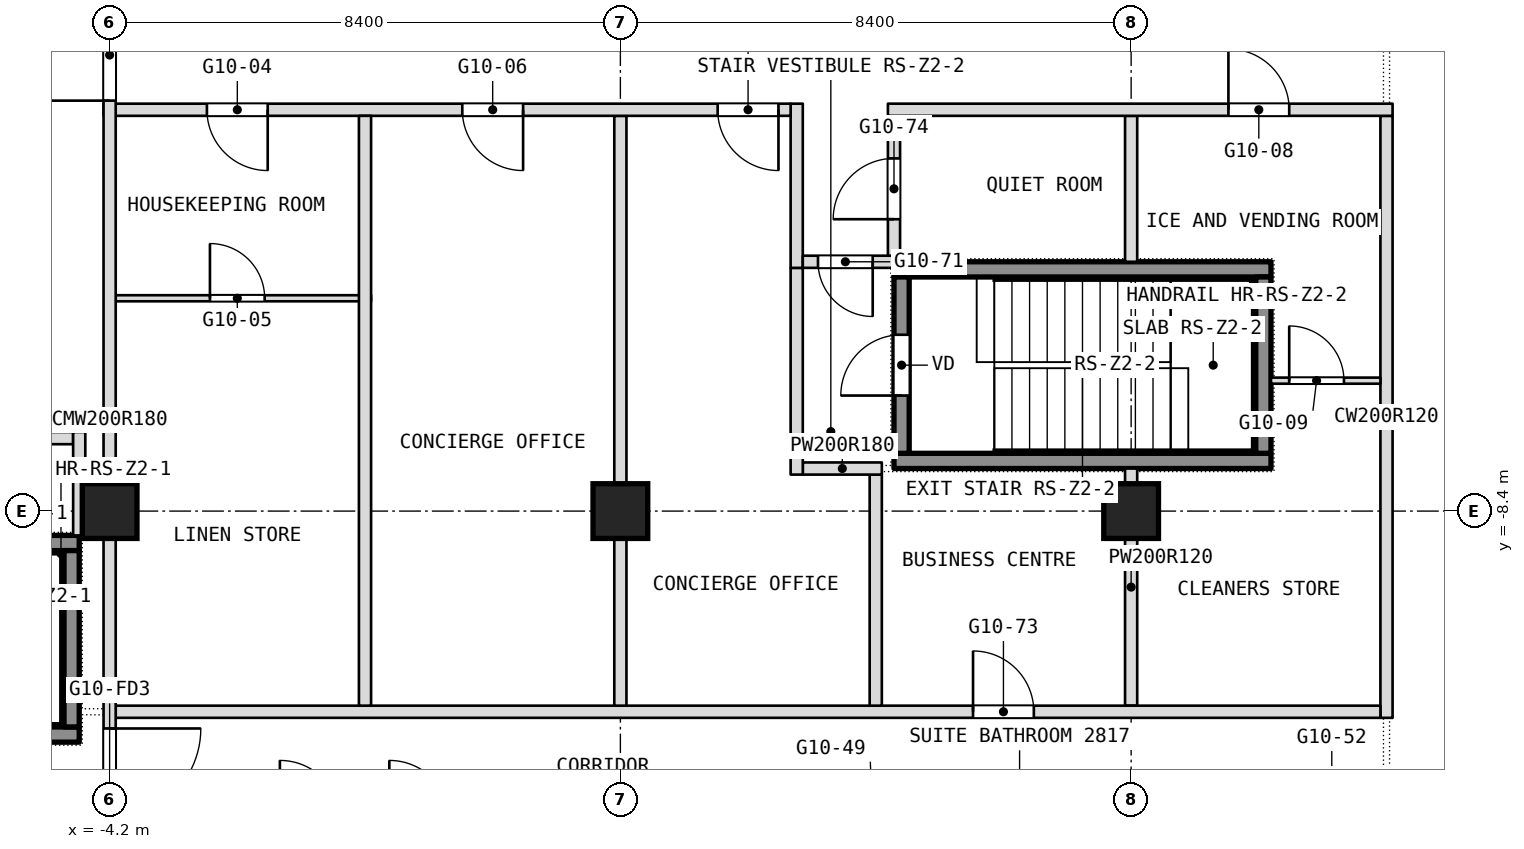
"""IFC4 building model, lengths in metres.
Left out: names, types, materials, properties, quantities, classifications, styles, units other than length and angle.
Written with IfcOpenShell. Run it as: python <this file> out.ifc"""

import sys

from ifc_helpers import new_model, si_unit, direction, frame, frame_2d, origin, origin_2d, place, context, subcontext, project, spatial, rectangle, extrude, element, fill, save


model = new_model("IFC4")
c1 = context("Model", 3, precision=1e-05, world=origin(), true_north=direction((0.0, 1.0)))
c2 = subcontext(c1, "Body", "Model", "MODEL_VIEW")
j1 = project(units=[si_unit("LENGTHUNIT", "METRE"), si_unit("PLANEANGLEUNIT", "RADIAN")], contexts=[c1])
p1 = place(None, origin())
s1 = spatial("IfcSite", under=j1, at=p1, CompositionType="ELEMENT")
p2 = place(p1, origin())
s2 = spatial("IfcBuilding", under=s1, at=p2, CompositionType="ELEMENT")
p3 = place(p2, frame((0.0, 0.0, 126.5)))
s3 = spatial("IfcBuildingStorey", under=s2, at=p3, CompositionType="ELEMENT", Elevation=126.5)
for number, where, z_axis, x_axis in (
    (1, (-4.2, -8.4, 0.0), (0.0, 0.0, 1.0), (1.0, 0.0, 0.0)),
    (2, (4.2, -8.4, 0.0), (0.0, 0.0, 1.0), (1.0, 0.0, 0.0)),
    (3, (12.6, -8.4, 0.0), (0.0, 0.0, 1.0), (1.0, 0.0, 0.0)),
):
    element("IfcColumn", number, at=place(p3, frame(where, z_axis=z_axis, x_axis=x_axis)), inside=s3, PredefinedType="COLUMN", context=c2, shape_type="SweptSolid", body=[
        extrude(rectangle(XDim=0.9, YDim=0.9, at=origin_2d()), origin(), (0.0, 0.0, 1.0), 3.6),
    ])
p4 = place(p3, frame((16.8, -11.8, 0.0), z_axis=(0.0, 0.0, 1.0), x_axis=(0.0, 1.0, 0.0)))
e4 = element("IfcWall", 4, at=p4, inside=s3, PredefinedType="PARTITIONING", context=c2, shape_type="SweptSolid", body=[
    extrude(rectangle(XDim=9.9, YDim=0.2, at=frame_2d((4.95, 0.0))), origin(), (0.0, 0.0, 1.0), 3.34),
])
p5 = place(p3, frame((12.6, -11.6, 0.0), z_axis=(0.0, 0.0, 1.0), x_axis=(0.0, 1.0, 0.0)))
e5 = element("IfcWall", 5, at=p5, inside=s3, PredefinedType="PARTITIONING", context=c2, shape_type="SweptSolid", body=[
    extrude(rectangle(XDim=3.9, YDim=0.2, at=frame_2d((1.95, 0.0))), origin(), (0.0, 0.0, 1.0), 3.34),
])
p6 = place(p3, frame((12.6, -4.3, 0.0), z_axis=(0.0, 0.0, 1.0), x_axis=(0.0, 1.0, 0.0)))
e6 = element("IfcWall", 6, at=p6, inside=s3, PredefinedType="PARTITIONING", context=c2, shape_type="SweptSolid", body=[
    extrude(rectangle(XDim=2.4, YDim=0.2, at=frame_2d((1.2, 0.0))), origin(), (0.0, 0.0, 1.0), 3.34),
])
p7 = place(p3, frame((-4.1, -11.7, 0.0), z_axis=(0.0, 0.0, 1.0), x_axis=(1.0, 0.0, 0.0)))
e7 = element("IfcWall", 7, at=p7, inside=s3, PredefinedType="PARTITIONING", context=c2, shape_type="SweptSolid", body=[
    extrude(rectangle(XDim=20.8, YDim=0.2, at=frame_2d((10.4, 0.0))), origin(), (0.0, 0.0, 1.0), 3.34),
])
p8 = place(p7, frame((14.1, 0.0, 0.0)))
e8 = element("IfcOpeningElement", 8, at=p8, cuts=e7, PredefinedType="OPENING", context=c2, shape_type="SweptSolid", body=[
    extrude(rectangle(XDim=1.0, YDim=2.1, at=frame_2d((0.5, 1.05))), frame((0.0, 0.1, 0.0), z_axis=(0.0, -1.0, 0.0), x_axis=(1.0, 0.0, 0.0)), (0.0, 0.0, 1.0), 0.2),
])
p9 = place(p3, frame((8.7, -4.3, 0.0), z_axis=(0.0, 0.0, 1.0), x_axis=(0.0, 1.0, 0.0)))
e9 = element("IfcWall", 9, at=p9, inside=s3, PredefinedType="PARTITIONING", context=c2, shape_type="SweptSolid", body=[
    extrude(rectangle(XDim=2.4, YDim=0.2, at=frame_2d((1.2, 0.0))), origin(), (0.0, 0.0, 1.0), 3.34),
])
p10 = place(p9, frame((0.7, 0.0, 0.0)))
e10 = element("IfcOpeningElement", 10, at=p10, cuts=e9, PredefinedType="OPENING", context=c2, shape_type="SweptSolid", body=[
    extrude(rectangle(XDim=1.0, YDim=2.1, at=frame_2d((0.5, 1.05))), frame((0.0, 0.1, 0.0), z_axis=(0.0, -1.0, 0.0), x_axis=(1.0, 0.0, 0.0)), (0.0, 0.0, 1.0), 0.2),
])
p11 = place(p3, frame((8.4, -11.6, 0.0), z_axis=(0.0, 0.0, 1.0), x_axis=(0.0, 1.0, 0.0)))
e11 = element("IfcWall", 11, at=p11, inside=s3, PredefinedType="PARTITIONING", context=c2, shape_type="SweptSolid", body=[
    extrude(rectangle(XDim=3.8, YDim=0.2, at=frame_2d((1.9, 0.0))), origin(), (0.0, 0.0, 1.0), 3.34),
])
p12 = place(p3, frame((7.2, -7.7, 0.0), z_axis=(0.0, 0.0, 1.0), x_axis=(1.0, 0.0, 0.0)))
e12 = element("IfcWall", 12, at=p12, inside=s3, PredefinedType="PARTITIONING", context=c2, shape_type="SweptSolid", body=[
    extrude(rectangle(XDim=1.3, YDim=0.2, at=frame_2d((0.65, 0.0))), origin(), (0.0, 0.0, 1.0), 3.34),
])
p13 = place(p3, frame((-8.5, -7.2, 0.0), z_axis=(0.0, 0.0, 1.0), x_axis=(1.0, 0.0, 0.0)))
e13 = element("IfcWall", 13, at=p13, inside=s3, PredefinedType="PARTITIONING", context=c2, shape_type="SweptSolid", body=[
    extrude(rectangle(XDim=3.7, YDim=0.2, at=frame_2d((1.85, 0.0))), origin(), (0.0, 0.0, 1.0), 3.34),
])
p14 = place(p13, frame((0.25, 0.0, 0.0)))
e14 = element("IfcOpeningElement", 14, at=p14, cuts=e13, PredefinedType="OPENING", context=c2, shape_type="SweptSolid", body=[
    extrude(rectangle(XDim=0.9, YDim=2.1, at=frame_2d((0.45, 1.05))), frame((0.0, 0.1, 0.0), z_axis=(0.0, -1.0, 0.0), x_axis=(1.0, 0.0, 0.0)), (0.0, 0.0, 1.0), 0.2),
])
p15 = place(p3, frame((7.1, -7.8, 0.0), z_axis=(0.0, 0.0, 1.0), x_axis=(0.0, 1.0, 0.0)))
e15 = element("IfcWall", 15, at=p15, inside=s3, PredefinedType="PARTITIONING", context=c2, shape_type="SweptSolid", body=[
    extrude(rectangle(XDim=3.4, YDim=0.2, at=frame_2d((1.7, 0.0))), origin(), (0.0, 0.0, 1.0), 3.34),
])
p16 = place(p3, frame((7.1, -4.4, 0.0), z_axis=(0.0, 0.0, 1.0), x_axis=(0.0, 1.0, 0.0)))
e16 = element("IfcWall", 16, at=p16, inside=s3, PredefinedType="PARTITIONING", context=c2, shape_type="SweptSolid", body=[
    extrude(rectangle(XDim=2.7, YDim=0.2, at=frame_2d((1.35, 0.0))), origin(), (0.0, 0.0, 1.0), 3.34),
])
p17 = place(p3, frame((14.9, -6.255, 0.0), z_axis=(0.0, 0.0, 1.0), x_axis=(1.0, 0.0, 0.0)))
e17 = element("IfcWall", 17, at=p17, inside=s3, PredefinedType="PARTITIONING", context=c2, shape_type="SweptSolid", body=[
    extrude(rectangle(XDim=1.8, YDim=0.1, at=frame_2d((0.9, 0.0))), origin(), (0.0, 0.0, 1.0), 3.34),
])
p18 = place(p17, frame((0.3, 0.0, 0.0)))
e18 = element("IfcOpeningElement", 18, at=p18, cuts=e17, PredefinedType="OPENING", context=c2, shape_type="SweptSolid", body=[
    extrude(rectangle(XDim=0.9, YDim=2.1, at=frame_2d((0.45, 1.05))), frame((0.0, 0.05, 0.0), z_axis=(0.0, -1.0, 0.0), x_axis=(1.0, 0.0, 0.0)), (0.0, 0.0, 1.0), 0.1),
])
p19 = place(p3, frame((-4.1, -4.9, 0.0), z_axis=(0.0, 0.0, 1.0), x_axis=(1.0, 0.0, 0.0)))
e19 = element("IfcWall", 19, at=p19, inside=s3, PredefinedType="PARTITIONING", context=c2, shape_type="SweptSolid", body=[
    extrude(rectangle(XDim=4.2, YDim=0.1, at=frame_2d((2.1, 0.0))), origin(), (0.0, 0.0, 1.0), 3.34),
])
p20 = place(p19, frame((1.55, 0.0, 0.0)))
e20 = element("IfcOpeningElement", 20, at=p20, cuts=e19, PredefinedType="OPENING", context=c2, shape_type="SweptSolid", body=[
    extrude(rectangle(XDim=0.9, YDim=2.1, at=frame_2d((0.45, 1.05))), frame((0.0, 0.05, 0.0), z_axis=(0.0, -1.0, 0.0), x_axis=(1.0, 0.0, 0.0)), (0.0, 0.0, 1.0), 0.1),
])
p21 = place(p3, frame((7.2, -4.3, 0.0), z_axis=(0.0, 0.0, 1.0), x_axis=(1.0, 0.0, 0.0)))
e21 = element("IfcWall", 21, at=p21, inside=s3, PredefinedType="PARTITIONING", context=c2, shape_type="SweptSolid", body=[
    extrude(rectangle(XDim=1.5, YDim=0.2, at=frame_2d((0.75, 0.0))), origin(), (0.0, 0.0, 1.0), 3.34),
])
p22 = place(p21, frame((0.25, 0.0, 0.0)))
e22 = element("IfcOpeningElement", 22, at=p22, cuts=e21, PredefinedType="OPENING", context=c2, shape_type="SweptSolid", body=[
    extrude(rectangle(XDim=0.9, YDim=2.1, at=frame_2d((0.45, 1.05))), frame((0.0, 0.1, 0.0), z_axis=(0.0, -1.0, 0.0), x_axis=(1.0, 0.0, 0.0)), (0.0, 0.0, 1.0), 0.2),
])
p23 = place(p3, frame((4.2, -11.6, 0.0), z_axis=(0.0, 0.0, 1.0), x_axis=(0.0, 1.0, 0.0)))
e23 = element("IfcWall", 23, at=p23, inside=s3, PredefinedType="PARTITIONING", context=c2, shape_type="SweptSolid", body=[
    extrude(rectangle(XDim=9.7, YDim=0.2, at=frame_2d((4.85, 0.0))), origin(), (0.0, 0.0, 1.0), 3.34),
])
p24 = place(p3, frame((-4.3, -1.8, 0.0), z_axis=(0.0, 0.0, 1.0), x_axis=(1.0, 0.0, 0.0)))
e24 = element("IfcWall", 24, at=p24, inside=s3, PredefinedType="PARTITIONING", context=c2, shape_type="SweptSolid", body=[
    extrude(rectangle(XDim=11.3, YDim=0.2, at=frame_2d((5.65, 0.0))), origin(), (0.0, 0.0, 1.0), 3.34),
])
p25 = place(p24, frame((1.7, 0.0, 0.0)))
e25 = element("IfcOpeningElement", 25, at=p25, cuts=e24, PredefinedType="OPENING", context=c2, shape_type="SweptSolid", body=[
    extrude(rectangle(XDim=1.0, YDim=2.1, at=frame_2d((0.5, 1.05))), frame((0.0, 0.1, 0.0), z_axis=(0.0, -1.0, 0.0), x_axis=(1.0, 0.0, 0.0)), (0.0, 0.0, 1.0), 0.2),
])
p26 = place(p24, frame((5.9, 0.0, 0.0)))
e26 = element("IfcOpeningElement", 26, at=p26, cuts=e24, PredefinedType="OPENING", context=c2, shape_type="SweptSolid", body=[
    extrude(rectangle(XDim=1.0, YDim=2.1, at=frame_2d((0.5, 1.05))), frame((0.0, 0.1, 0.0), z_axis=(0.0, -1.0, 0.0), x_axis=(1.0, 0.0, 0.0)), (0.0, 0.0, 1.0), 0.2),
])
p27 = place(p24, frame((10.1, 0.0, 0.0)))
e27 = element("IfcOpeningElement", 27, at=p27, cuts=e24, PredefinedType="OPENING", context=c2, shape_type="SweptSolid", body=[
    extrude(rectangle(XDim=1.0, YDim=2.1, at=frame_2d((0.5, 1.05))), frame((0.0, 0.1, 0.0), z_axis=(0.0, -1.0, 0.0), x_axis=(1.0, 0.0, 0.0)), (0.0, 0.0, 1.0), 0.2),
])
p28 = place(p3, frame((8.6, -1.8, 0.0), z_axis=(0.0, 0.0, 1.0), x_axis=(1.0, 0.0, 0.0)))
e28 = element("IfcWall", 28, at=p28, inside=s3, PredefinedType="PARTITIONING", context=c2, shape_type="SweptSolid", body=[
    extrude(rectangle(XDim=8.3, YDim=0.2, at=frame_2d((4.15, 0.0))), origin(), (0.0, 0.0, 1.0), 3.34),
])
p29 = place(p28, frame((5.6, 0.0, 0.0)))
e29 = element("IfcOpeningElement", 29, at=p29, cuts=e28, PredefinedType="OPENING", context=c2, shape_type="SweptSolid", body=[
    extrude(rectangle(XDim=1.0, YDim=2.1, at=frame_2d((0.5, 1.05))), frame((0.0, 0.1, 0.0), z_axis=(0.0, -1.0, 0.0), x_axis=(1.0, 0.0, 0.0)), (0.0, 0.0, 1.0), 0.2),
])
p30 = place(p3, frame((0.0, -11.6, 0.0), z_axis=(0.0, 0.0, 1.0), x_axis=(0.0, 1.0, 0.0)))
e30 = element("IfcWall", 30, at=p30, inside=s3, PredefinedType="PARTITIONING", context=c2, shape_type="SweptSolid", body=[
    extrude(rectangle(XDim=9.7, YDim=0.2, at=frame_2d((4.85, 0.0))), origin(), (0.0, 0.0, 1.0), 3.34),
])
p31 = place(p3, frame((-4.2, -13.8, 0.0), z_axis=(0.0, 0.0, 1.0), x_axis=(0.0, 1.0, 0.0)))
e31 = element("IfcWall", 31, at=p31, inside=s3, PredefinedType="PARTITIONING", context=c2, shape_type="SweptSolid", body=[
    extrude(rectangle(XDim=13.8, YDim=0.2, at=frame_2d((6.9, 0.0))), origin(), (0.0, 0.0, 1.0), 3.34),
])
p32 = place(p31, frame((12.15, 0.0, 0.0)))
e32 = element("IfcOpeningElement", 32, at=p32, cuts=e31, PredefinedType="OPENING", context=c2, shape_type="SweptSolid", body=[
    extrude(rectangle(XDim=1.5, YDim=2.1, at=frame_2d((0.75, 1.05))), frame((0.0, 0.1, 0.0), z_axis=(0.0, -1.0, 0.0), x_axis=(1.0, 0.0, 0.0)), (0.0, 0.0, 1.0), 0.2),
])
p33 = place(p31, frame((0.325, 0.0, 0.0)))
e33 = element("IfcOpeningElement", 33, at=p33, cuts=e31, PredefinedType="OPENING", context=c2, shape_type="SweptSolid", body=[
    extrude(rectangle(XDim=1.5, YDim=2.1, at=frame_2d((0.75, 1.05))), frame((0.0, 0.1, 0.0), z_axis=(0.0, -1.0, 0.0), x_axis=(1.0, 0.0, 0.0)), (0.0, 0.0, 1.0), 0.2),
])
p34 = place(p3, frame((-4.7, -8.8, 0.0), z_axis=(0.0, 0.0, 1.0), x_axis=(0.0, 1.0, 0.0)))
e34 = element("IfcWall", 34, at=p34, inside=s3, PredefinedType="PARTITIONING", context=c2, shape_type="SweptSolid", body=[
    extrude(rectangle(XDim=1.7, YDim=0.2, at=frame_2d((0.85, 0.0))), origin(), (0.0, 0.0, 1.0), 3.34),
])
p35 = place(p3, frame((-10.9, -12.075, 0.1), z_axis=(0.0, 0.0, 1.0), x_axis=(1.0, 0.0, 0.0)))
e35 = element("IfcWall", 35, at=p35, inside=s3, PredefinedType="SHEAR", context=c2, shape_type="SweptSolid", body=[
    extrude(rectangle(XDim=6.2, YDim=0.25, at=frame_2d((3.1, 0.0))), origin(), (0.0, 0.0, 1.0), 3.6),
])
p36 = place(p3, frame((-10.9, -8.925, 0.1), z_axis=(0.0, 0.0, 1.0), x_axis=(1.0, 0.0, 0.0)))
e36 = element("IfcWall", 36, at=p36, inside=s3, PredefinedType="SHEAR", context=c2, shape_type="SweptSolid", body=[
    extrude(rectangle(XDim=6.2, YDim=0.25, at=frame_2d((3.1, 0.0))), origin(), (0.0, 0.0, 1.0), 3.6),
])
p37 = place(p36, frame((0.45, 0.0, 0.0)))
e37 = element("IfcOpeningElement", 37, at=p37, cuts=e36, PredefinedType="OPENING", context=c2, shape_type="SweptSolid", body=[
    extrude(rectangle(XDim=1.0, YDim=2.1, at=frame_2d((0.5, 1.05))), frame((0.0, 0.125, 0.0), z_axis=(0.0, -1.0, 0.0), x_axis=(1.0, 0.0, 0.0)), (0.0, 0.0, 1.0), 0.25),
])
p38 = place(p3, frame((-4.825, -11.95, 0.1), z_axis=(0.0, 0.0, 1.0), x_axis=(0.0, 1.0, 0.0)))
e38 = element("IfcWall", 38, at=p38, inside=s3, PredefinedType="SHEAR", context=c2, shape_type="SweptSolid", body=[
    extrude(rectangle(XDim=2.9, YDim=0.25, at=frame_2d((1.45, 0.0))), origin(), (0.0, 0.0, 1.0), 3.6),
])
for number, where, z_axis, x_axis in (
    (39, (8.7, -7.575, 0.1), (0.0, 0.0, 1.0), (1.0, 0.0, 0.0)),
    (40, (8.7, -4.425, 0.1), (0.0, 0.0, 1.0), (1.0, 0.0, 0.0)),
):
    element("IfcWall", number, at=place(p3, frame(where, z_axis=z_axis, x_axis=x_axis)), inside=s3, PredefinedType="SHEAR", context=c2, shape_type="SweptSolid", body=[
        extrude(rectangle(XDim=6.2, YDim=0.25, at=frame_2d((3.1, 0.0))), origin(), (0.0, 0.0, 1.0), 3.6),
    ])
p39 = place(p3, frame((8.825, -7.45, 0.1), z_axis=(0.0, 0.0, 1.0), x_axis=(0.0, 1.0, 0.0)))
e41 = element("IfcWall", 41, at=p39, inside=s3, PredefinedType="SHEAR", context=c2, shape_type="SweptSolid", body=[
    extrude(rectangle(XDim=2.9, YDim=0.25, at=frame_2d((1.45, 0.0))), origin(), (0.0, 0.0, 1.0), 3.6),
])
p40 = place(p39, frame((0.95, 0.0, 0.0)))
e42 = element("IfcOpeningElement", 42, at=p40, cuts=e41, PredefinedType="OPENING", context=c2, shape_type="SweptSolid", body=[
    extrude(rectangle(XDim=1.0, YDim=2.1, at=frame_2d((0.5, 1.05))), frame((0.0, 0.125, 0.0), z_axis=(0.0, -1.0, 0.0), x_axis=(1.0, 0.0, 0.0)), (0.0, 0.0, 1.0), 0.25),
])
p41 = place(p3, frame((14.775, -7.45, 0.1), z_axis=(0.0, 0.0, 1.0), x_axis=(0.0, 1.0, 0.0)))
e43 = element("IfcWall", 43, at=p41, inside=s3, PredefinedType="SHEAR", context=c2, shape_type="SweptSolid", body=[
    extrude(rectangle(XDim=2.9, YDim=0.25, at=frame_2d((1.45, 0.0))), origin(), (0.0, 0.0, 1.0), 3.6),
])
p42 = place(p8, origin())
e44 = element("IfcDoor", 44, at=p42, inside=s3, OperationType="SINGLE_SWING_LEFT", PredefinedType="DOOR", context=c2, shape_type="SweptSolid", body=[
    extrude(rectangle(XDim=1.0, YDim=2.1, at=frame_2d((0.5, 1.05))), frame((0.0, 0.025, 0.0), z_axis=(0.0, -1.0, 0.0), x_axis=(1.0, 0.0, 0.0)), (0.0, 0.0, 1.0), 0.05),
])
fill(e8, e44)
p43 = place(p10, origin())
e45 = element("IfcDoor", 45, at=p43, inside=s3, OperationType="SINGLE_SWING_LEFT", PredefinedType="DOOR", context=c2, shape_type="SweptSolid", body=[
    extrude(rectangle(XDim=1.0, YDim=2.1, at=frame_2d((0.5, 1.05))), frame((0.0, 0.025, 0.0), z_axis=(0.0, -1.0, 0.0), x_axis=(1.0, 0.0, 0.0)), (0.0, 0.0, 1.0), 0.05),
])
fill(e10, e45)
p44 = place(p18, origin())
e46 = element("IfcDoor", 46, at=p44, inside=s3, OperationType="SINGLE_SWING_LEFT", PredefinedType="DOOR", context=c2, shape_type="SweptSolid", body=[
    extrude(rectangle(XDim=0.9, YDim=2.1, at=frame_2d((0.45, 1.05))), frame((0.0, 0.025, 0.0), z_axis=(0.0, -1.0, 0.0), x_axis=(1.0, 0.0, 0.0)), (0.0, 0.0, 1.0), 0.05),
])
fill(e18, e46)
p45 = place(p20, origin())
e47 = element("IfcDoor", 47, at=p45, inside=s3, OperationType="SINGLE_SWING_LEFT", PredefinedType="DOOR", context=c2, shape_type="SweptSolid", body=[
    extrude(rectangle(XDim=0.9, YDim=2.1, at=frame_2d((0.45, 1.05))), frame((0.0, 0.025, 0.0), z_axis=(0.0, -1.0, 0.0), x_axis=(1.0, 0.0, 0.0)), (0.0, 0.0, 1.0), 0.05),
])
fill(e20, e47)
p46 = place(p22, origin())
e48 = element("IfcDoor", 48, at=p46, inside=s3, OperationType="SINGLE_SWING_LEFT", PredefinedType="DOOR", context=c2, shape_type="SweptSolid", body=[
    extrude(rectangle(XDim=0.9, YDim=2.1, at=frame_2d((0.45, 1.05))), frame((0.0, 0.025, 0.0), z_axis=(0.0, -1.0, 0.0), x_axis=(1.0, 0.0, 0.0)), (0.0, 0.0, 1.0), 0.05),
])
fill(e22, e48)
p47 = place(p25, origin())
e49 = element("IfcDoor", 49, at=p47, inside=s3, OperationType="SINGLE_SWING_RIGHT", PredefinedType="DOOR", context=c2, shape_type="SweptSolid", body=[
    extrude(rectangle(XDim=1.0, YDim=2.1, at=frame_2d((0.5, 1.05))), frame((0.0, 0.025, 0.0), z_axis=(0.0, -1.0, 0.0), x_axis=(1.0, 0.0, 0.0)), (0.0, 0.0, 1.0), 0.05),
])
fill(e25, e49)
p48 = place(p26, origin())
e50 = element("IfcDoor", 50, at=p48, inside=s3, OperationType="SINGLE_SWING_RIGHT", PredefinedType="DOOR", context=c2, shape_type="SweptSolid", body=[
    extrude(rectangle(XDim=1.0, YDim=2.1, at=frame_2d((0.5, 1.05))), frame((0.0, 0.025, 0.0), z_axis=(0.0, -1.0, 0.0), x_axis=(1.0, 0.0, 0.0)), (0.0, 0.0, 1.0), 0.05),
])
fill(e26, e50)
p49 = place(p27, origin())
e51 = element("IfcDoor", 51, at=p49, inside=s3, OperationType="SINGLE_SWING_LEFT", PredefinedType="DOOR", context=c2, shape_type="SweptSolid", body=[
    extrude(rectangle(XDim=1.0, YDim=2.1, at=frame_2d((0.5, 1.05))), frame((0.0, 0.025, 0.0), z_axis=(0.0, -1.0, 0.0), x_axis=(1.0, 0.0, 0.0)), (0.0, 0.0, 1.0), 0.05),
])
fill(e27, e51)
p50 = place(p29, origin())
e52 = element("IfcDoor", 52, at=p50, inside=s3, OperationType="SINGLE_SWING_RIGHT", PredefinedType="DOOR", context=c2, shape_type="SweptSolid", body=[
    extrude(rectangle(XDim=1.0, YDim=2.1, at=frame_2d((0.5, 1.05))), frame((0.0, 0.025, 0.0), z_axis=(0.0, -1.0, 0.0), x_axis=(1.0, 0.0, 0.0)), (0.0, 0.0, 1.0), 0.05),
])
fill(e29, e52)
p51 = place(p40, origin())
e53 = element("IfcDoor", 53, at=p51, inside=s3, OperationType="SINGLE_SWING_LEFT", PredefinedType="DOOR", context=c2, shape_type="SweptSolid", body=[
    extrude(rectangle(XDim=1.0, YDim=2.1, at=frame_2d((0.5, 1.05))), frame((0.0, 0.025, 0.0), z_axis=(0.0, -1.0, 0.0), x_axis=(1.0, 0.0, 0.0)), (0.0, 0.0, 1.0), 0.05),
])
fill(e42, e53)
p52 = place(p32, origin())
e54 = element("IfcDoor", 54, at=p52, inside=s3, OperationType="DOUBLE_DOOR_DOUBLE_SWING", PredefinedType="DOOR", context=c2, shape_type="SweptSolid", body=[
    extrude(rectangle(XDim=1.5, YDim=2.1, at=frame_2d((0.75, 1.05))), frame((0.0, 0.025, 0.0), z_axis=(0.0, -1.0, 0.0), x_axis=(1.0, 0.0, 0.0)), (0.0, 0.0, 1.0), 0.05),
])
fill(e32, e54)
p53 = place(p33, origin())
e55 = element("IfcDoor", 55, at=p53, inside=s3, OperationType="DOUBLE_DOOR_DOUBLE_SWING", PredefinedType="DOOR", context=c2, shape_type="SweptSolid", body=[
    extrude(rectangle(XDim=1.5, YDim=2.1, at=frame_2d((0.75, 1.05))), frame((0.0, 0.025, 0.0), z_axis=(0.0, -1.0, 0.0), x_axis=(1.0, 0.0, 0.0)), (0.0, 0.0, 1.0), 0.05),
])
fill(e33, e55)
save(model, sys.argv[1])
